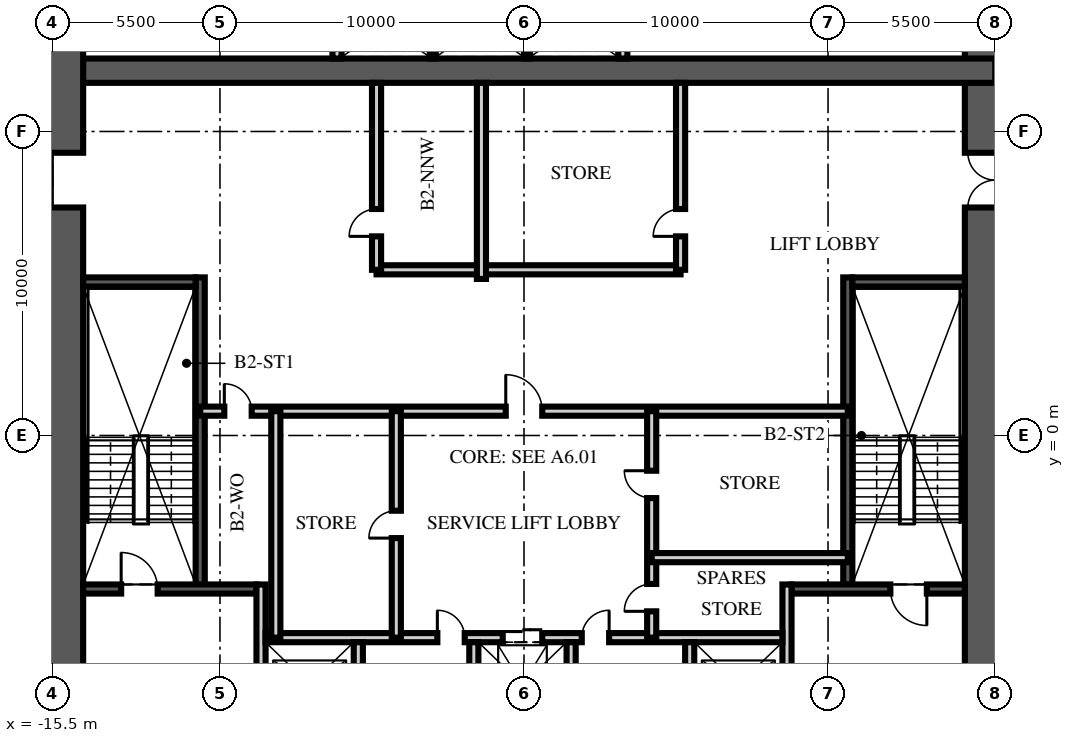
"""IFC4 building model, lengths in metres.
Left out: names, types, materials, properties, quantities, classifications, styles, units other than length and angle.
Written with IfcOpenShell. Run it as: python <this file> out.ifc"""

import sys

from ifc_helpers import new_model, si_unit, direction, frame, frame_2d, origin, place, context, subcontext, project, spatial, rectangle, extrude, element, fill, save


model = new_model("IFC4")
c1 = context("Model", 3, precision=1e-05, world=origin(), true_north=direction((0.0, 1.0)))
c2 = subcontext(c1, "Body", "Model", "MODEL_VIEW")
j1 = project(units=[si_unit("LENGTHUNIT", "METRE"), si_unit("PLANEANGLEUNIT", "RADIAN")], contexts=[c1])
p1 = place(None, origin())
s1 = spatial("IfcSite", under=j1, at=p1, CompositionType="ELEMENT")
p2 = place(p1, origin())
s2 = spatial("IfcBuilding", under=s1, at=p2, CompositionType="ELEMENT")
p3 = place(p2, frame((0.0, 0.0, -9.0)))
s3 = spatial("IfcBuildingStorey", under=s2, at=p3, CompositionType="ELEMENT", Elevation=-9.0)
p4 = place(p3, frame((15.5, -15.5, -0.3), z_axis=(0.0, 0.0, 1.0), x_axis=(0.0, 1.0, 0.0)))
e1 = element("IfcWall", 1, at=p4, inside=s3, PredefinedType="SHEAR", context=c2, shape_type="SweptSolid", body=[
    extrude(rectangle(XDim=31.0, YDim=2.0, at=frame_2d((15.5, 0.0))), origin(), (0.0, 0.0, 1.0), 3.6),
])
p5 = place(p4, frame((6.5, 0.0, 0.3)))
e2 = element("IfcOpeningElement", 2, at=p5, cuts=e1, PredefinedType="OPENING", context=c2, shape_type="SweptSolid", body=[
    extrude(rectangle(XDim=1.2, YDim=2.1, at=frame_2d((0.6, 1.05))), frame((0.0, 1.01, 0.0), z_axis=(0.0, -1.0, 0.0), x_axis=(1.0, 0.0, 0.0)), (0.0, 0.0, 1.0), 2.02),
])
p6 = place(p4, frame((23.0, 0.0, 0.3)))
e3 = element("IfcOpeningElement", 3, at=p6, cuts=e1, PredefinedType="OPENING", context=c2, shape_type="SweptSolid", body=[
    extrude(rectangle(XDim=1.8, YDim=2.1, at=frame_2d((0.9, 1.05))), frame((0.0, 1.01, 0.0), z_axis=(0.0, -1.0, 0.0), x_axis=(1.0, 0.0, 0.0)), (0.0, 0.0, 1.0), 2.02),
])
p7 = place(p3, frame((-15.5, 12.0, -0.3), z_axis=(0.0, 0.0, 1.0), x_axis=(1.0, 0.0, 0.0)))
e4 = element("IfcWall", 4, at=p7, inside=s3, PredefinedType="SHEAR", context=c2, shape_type="SweptSolid", body=[
    extrude(rectangle(XDim=31.0, YDim=0.8, at=frame_2d((15.5, 0.0))), origin(), (0.0, 0.0, 1.0), 3.6),
])
p8 = place(p3, frame((-15.5, -15.5, -0.3), z_axis=(0.0, 0.0, 1.0), x_axis=(0.0, 1.0, 0.0)))
e5 = element("IfcWall", 5, at=p8, inside=s3, PredefinedType="SHEAR", context=c2, shape_type="SweptSolid", body=[
    extrude(rectangle(XDim=31.0, YDim=2.0, at=frame_2d((15.5, 0.0))), origin(), (0.0, 0.0, 1.0), 3.6),
])
p9 = place(p8, frame((6.5, 0.0, 0.3)))
e6 = element("IfcOpeningElement", 6, at=p9, cuts=e5, PredefinedType="OPENING", context=c2, shape_type="SweptSolid", body=[
    extrude(rectangle(XDim=1.2, YDim=2.1, at=frame_2d((0.6, 1.05))), frame((0.0, 1.01, 0.0), z_axis=(0.0, -1.0, 0.0), x_axis=(1.0, 0.0, 0.0)), (0.0, 0.0, 1.0), 2.02),
])
p10 = place(p8, frame((23.0, 0.0, 0.3)))
e7 = element("IfcOpeningElement", 7, at=p10, cuts=e5, PredefinedType="OPENING", context=c2, shape_type="SweptSolid", body=[
    extrude(rectangle(XDim=1.8, YDim=2.1, at=frame_2d((0.9, 1.05))), frame((0.0, 1.01, 0.0), z_axis=(0.0, -1.0, 0.0), x_axis=(1.0, 0.0, 0.0)), (0.0, 0.0, 1.0), 2.02),
])
p11 = place(p3, frame((-10.65, -4.9, 0.0), z_axis=(0.0, 0.0, 1.0), x_axis=(0.0, 1.0, 0.0)))
e8 = element("IfcWall", 8, at=p11, inside=s3, PredefinedType="SOLIDWALL", context=c2, shape_type="SweptSolid", body=[
    extrude(rectangle(XDim=10.1, YDim=0.3, at=frame_2d((5.05, 0.0))), origin(), (0.0, 0.0, 1.0), 3.3),
])
p12 = place(p3, frame((-14.5, -5.05, 0.0), z_axis=(0.0, 0.0, 1.0), x_axis=(1.0, 0.0, 0.0)))
e9 = element("IfcWall", 9, at=p12, inside=s3, PredefinedType="SOLIDWALL", context=c2, shape_type="SweptSolid", body=[
    extrude(rectangle(XDim=5.7, YDim=0.3, at=frame_2d((2.85, 0.0))), origin(), (0.0, 0.0, 1.0), 3.3),
])
p13 = place(p12, frame((1.25, 0.0, 0.0)))
e10 = element("IfcOpeningElement", 10, at=p13, cuts=e9, PredefinedType="OPENING", context=c2, shape_type="SweptSolid", body=[
    extrude(rectangle(XDim=1.2, YDim=2.1, at=frame_2d((0.6, 1.05))), frame((0.0, 0.16, 0.0), z_axis=(0.0, -1.0, 0.0), x_axis=(1.0, 0.0, 0.0)), (0.0, 0.0, 1.0), 0.32),
])
p14 = place(p3, frame((-14.5, 5.05, 0.0), z_axis=(0.0, 0.0, 1.0), x_axis=(1.0, 0.0, 0.0)))
e11 = element("IfcWall", 11, at=p14, inside=s3, PredefinedType="SOLIDWALL", context=c2, shape_type="SweptSolid", body=[
    extrude(rectangle(XDim=3.7, YDim=0.3, at=frame_2d((1.85, 0.0))), origin(), (0.0, 0.0, 1.0), 3.3),
])
p15 = place(p3, frame((-8.65, -11.6, 0.0), z_axis=(0.0, 0.0, 1.0), x_axis=(0.0, 1.0, 0.0)))
e12 = element("IfcWall", 12, at=p15, inside=s3, PredefinedType="PARTITIONING", context=c2, shape_type="SweptSolid", body=[
    extrude(rectangle(XDim=6.7, YDim=0.3, at=frame_2d((3.35, 0.0))), origin(), (0.0, 0.0, 1.0), 3.3),
])
p16 = place(p15, frame((2.85, 0.0, 0.0)))
e13 = element("IfcOpeningElement", 13, at=p16, cuts=e12, PredefinedType="OPENING", context=c2, shape_type="SweptSolid", body=[
    extrude(rectangle(XDim=1.1, YDim=2.1, at=frame_2d((0.55, 1.05))), frame((0.0, 0.16, 0.0), z_axis=(0.0, -1.0, 0.0), x_axis=(1.0, 0.0, 0.0)), (0.0, 0.0, 1.0), 0.32),
])
p17 = place(p3, frame((10.65, -4.9, 0.0), z_axis=(0.0, 0.0, 1.0), x_axis=(0.0, 1.0, 0.0)))
e14 = element("IfcWall", 14, at=p17, inside=s3, PredefinedType="SOLIDWALL", context=c2, shape_type="SweptSolid", body=[
    extrude(rectangle(XDim=10.1, YDim=0.3, at=frame_2d((5.05, 0.0))), origin(), (0.0, 0.0, 1.0), 3.3),
])
p18 = place(p3, frame((14.5, -5.05, 0.0), z_axis=(0.0, 0.0, 1.0), x_axis=(-1.0, 0.0, 0.0)))
e15 = element("IfcWall", 15, at=p18, inside=s3, PredefinedType="SOLIDWALL", context=c2, shape_type="SweptSolid", body=[
    extrude(rectangle(XDim=5.7, YDim=0.3, at=frame_2d((2.85, 0.0))), origin(), (0.0, 0.0, 1.0), 3.3),
])
p19 = place(p18, frame((1.25, 0.0, 0.0)))
e16 = element("IfcOpeningElement", 16, at=p19, cuts=e15, PredefinedType="OPENING", context=c2, shape_type="SweptSolid", body=[
    extrude(rectangle(XDim=1.2, YDim=2.1, at=frame_2d((0.6, 1.05))), frame((0.0, 0.16, 0.0), z_axis=(0.0, -1.0, 0.0), x_axis=(1.0, 0.0, 0.0)), (0.0, 0.0, 1.0), 0.32),
])
p20 = place(p3, frame((14.5, 5.05, 0.0), z_axis=(0.0, 0.0, 1.0), x_axis=(-1.0, 0.0, 0.0)))
e17 = element("IfcWall", 17, at=p20, inside=s3, PredefinedType="SOLIDWALL", context=c2, shape_type="SweptSolid", body=[
    extrude(rectangle(XDim=3.7, YDim=0.3, at=frame_2d((1.85, 0.0))), origin(), (0.0, 0.0, 1.0), 3.3),
])
p21 = place(p3, frame((8.65, -11.6, 0.0), z_axis=(0.0, 0.0, 1.0), x_axis=(0.0, 1.0, 0.0)))
e18 = element("IfcWall", 18, at=p21, inside=s3, PredefinedType="PARTITIONING", context=c2, shape_type="SweptSolid", body=[
    extrude(rectangle(XDim=6.7, YDim=0.3, at=frame_2d((3.35, 0.0))), origin(), (0.0, 0.0, 1.0), 3.3),
])
p22 = place(p21, frame((2.85, 0.0, 0.0)))
e19 = element("IfcOpeningElement", 19, at=p22, cuts=e18, PredefinedType="OPENING", context=c2, shape_type="SweptSolid", body=[
    extrude(rectangle(XDim=1.1, YDim=2.1, at=frame_2d((0.55, 1.05))), frame((0.0, 0.16, 0.0), z_axis=(0.0, -1.0, 0.0), x_axis=(1.0, 0.0, 0.0)), (0.0, 0.0, 1.0), 0.32),
])
p23 = place(p3, frame((-8.5, -6.65, 0.0), z_axis=(0.0, 0.0, 1.0), x_axis=(1.0, 0.0, 0.0)))
e20 = element("IfcWall", 20, at=p23, inside=s3, PredefinedType="PARTITIONING", context=c2, shape_type="SweptSolid", body=[
    extrude(rectangle(XDim=17.0, YDim=0.3, at=frame_2d((8.5, 0.0))), origin(), (0.0, 0.0, 1.0), 3.3),
])
p24 = place(p23, frame((7.8, 0.0, 0.0)))
e21 = element("IfcOpeningElement", 21, at=p24, cuts=e20, PredefinedType="OPENING", context=c2, shape_type="SweptSolid", body=[
    extrude(rectangle(XDim=1.3, YDim=2.4, at=frame_2d((0.65, 1.2))), frame((0.0, 0.16, 0.0), z_axis=(0.0, -1.0, 0.0), x_axis=(1.0, 0.0, 0.0)), (0.0, 0.0, 1.0), 0.32),
])
p25 = place(p23, frame((5.65, 0.0, 0.0)))
e22 = element("IfcOpeningElement", 22, at=p25, cuts=e20, PredefinedType="OPENING", context=c2, shape_type="SweptSolid", body=[
    extrude(rectangle(XDim=0.9, YDim=2.1, at=frame_2d((0.45, 1.05))), frame((0.0, 0.16, 0.0), z_axis=(0.0, -1.0, 0.0), x_axis=(1.0, 0.0, 0.0)), (0.0, 0.0, 1.0), 0.32),
])
p26 = place(p23, frame((10.4, 0.0, 0.0)))
e23 = element("IfcOpeningElement", 23, at=p26, cuts=e20, PredefinedType="OPENING", context=c2, shape_type="SweptSolid", body=[
    extrude(rectangle(XDim=0.9, YDim=2.1, at=frame_2d((0.45, 1.05))), frame((0.0, 0.16, 0.0), z_axis=(0.0, -1.0, 0.0), x_axis=(1.0, 0.0, 0.0)), (0.0, 0.0, 1.0), 0.32),
])
for number, where, z_axis, x_axis in (
    (24, (-5.45, -11.6, 0.0), (0.0, 0.0, 1.0), (0.0, 1.0, 0.0)),
    (25, (-1.65, -11.6, 0.0), (0.0, 0.0, 1.0), (0.0, 1.0, 0.0)),
    (26, (1.55, -11.6, 0.0), (0.0, 0.0, 1.0), (0.0, 1.0, 0.0)),
    (27, (5.45, -11.6, 0.0), (0.0, 0.0, 1.0), (0.0, 1.0, 0.0)),
):
    element("IfcWall", number, at=place(p3, frame(where, z_axis=z_axis, x_axis=x_axis)), inside=s3, PredefinedType="PARTITIONING", context=c2, shape_type="SweptSolid", body=[
        extrude(rectangle(XDim=4.8, YDim=0.3, at=frame_2d((2.4, 0.0))), origin(), (0.0, 0.0, 1.0), 3.3),
    ])
for number, where, z_axis, x_axis in (
    (28, (-6.15, 12.4, 0.0), (0.0, 0.0, 1.0), (0.0, 1.0, 0.0)),
    (29, (3.25, 12.4, 0.0), (0.0, 0.0, 1.0), (0.0, 1.0, 0.0)),
):
    element("IfcWall", number, at=place(p3, frame(where, z_axis=z_axis, x_axis=x_axis)), inside=s3, PredefinedType="PARTITIONING", context=c2, shape_type="SweptSolid", body=[
        extrude(rectangle(XDim=2.1, YDim=0.3, at=frame_2d((1.05, 0.0))), origin(), (0.0, 0.0, 1.0), 3.3),
    ])
for number, where, z_axis, x_axis in (
    (30, (-3.0, 12.4, 0.0), (0.0, 0.0, 1.0), (0.0, 1.0, 0.0)),
    (31, (0.1, 12.4, 0.0), (0.0, 0.0, 1.0), (0.0, 1.0, 0.0)),
):
    element("IfcWall", number, at=place(p3, frame(where, z_axis=z_axis, x_axis=x_axis)), inside=s3, PredefinedType="PARTITIONING", context=c2, shape_type="SweptSolid", body=[
        extrude(rectangle(XDim=2.1, YDim=0.2, at=frame_2d((1.05, 0.0))), origin(), (0.0, 0.0, 1.0), 3.3),
    ])
p27 = place(p3, frame((-10.65, 0.8, 0.0), z_axis=(0.0, 0.0, 1.0), x_axis=(1.0, 0.0, 0.0)))
e32 = element("IfcWall", 32, at=p27, inside=s3, PredefinedType="PARTITIONING", context=c2, shape_type="SweptSolid", body=[
    extrude(rectangle(XDim=21.3, YDim=0.3, at=frame_2d((10.65, 0.0))), origin(), (0.0, 0.0, 1.0), 3.3),
])
p28 = place(p27, frame((10.05, 0.0, 0.0)))
e33 = element("IfcOpeningElement", 33, at=p28, cuts=e32, PredefinedType="OPENING", context=c2, shape_type="SweptSolid", body=[
    extrude(rectangle(XDim=1.2, YDim=2.1, at=frame_2d((0.6, 1.05))), frame((0.0, 0.16, 0.0), z_axis=(0.0, -1.0, 0.0), x_axis=(1.0, 0.0, 0.0)), (0.0, 0.0, 1.0), 0.32),
])
p29 = place(p27, frame((0.793, 0.0, 0.0)))
e34 = element("IfcOpeningElement", 34, at=p29, cuts=e32, PredefinedType="OPENING", context=c2, shape_type="SweptSolid", body=[
    extrude(rectangle(XDim=0.9, YDim=2.1, at=frame_2d((0.45, 1.05))), frame((0.0, 0.16, 0.0), z_axis=(0.0, -1.0, 0.0), x_axis=(1.0, 0.0, 0.0)), (0.0, 0.0, 1.0), 0.32),
])
p30 = place(p3, frame((-4.2, -6.65, 0.0), z_axis=(0.0, 0.0, 1.0), x_axis=(0.0, 1.0, 0.0)))
e35 = element("IfcWall", 35, at=p30, inside=s3, PredefinedType="PARTITIONING", context=c2, shape_type="SweptSolid", body=[
    extrude(rectangle(XDim=7.45, YDim=0.3, at=frame_2d((3.725, 0.0))), origin(), (0.0, 0.0, 1.0), 3.3),
])
p31 = place(p30, frame((3.275, 0.0, 0.0)))
e36 = element("IfcOpeningElement", 36, at=p31, cuts=e35, PredefinedType="OPENING", context=c2, shape_type="SweptSolid", body=[
    extrude(rectangle(XDim=0.9, YDim=2.1, at=frame_2d((0.45, 1.05))), frame((0.0, 0.16, 0.0), z_axis=(0.0, -1.0, 0.0), x_axis=(1.0, 0.0, 0.0)), (0.0, 0.0, 1.0), 0.32),
])
p32 = place(p3, frame((4.2, -6.65, 0.0), z_axis=(0.0, 0.0, 1.0), x_axis=(0.0, 1.0, 0.0)))
e37 = element("IfcWall", 37, at=p32, inside=s3, PredefinedType="PARTITIONING", context=c2, shape_type="SweptSolid", body=[
    extrude(rectangle(XDim=7.45, YDim=0.3, at=frame_2d((3.725, 0.0))), origin(), (0.0, 0.0, 1.0), 3.3),
])
p33 = place(p32, frame((0.866, 0.0, 0.0)))
e38 = element("IfcOpeningElement", 38, at=p33, cuts=e37, PredefinedType="OPENING", context=c2, shape_type="SweptSolid", body=[
    extrude(rectangle(XDim=0.9, YDim=2.1, at=frame_2d((0.45, 1.05))), frame((0.0, 0.16, 0.0), z_axis=(0.0, -1.0, 0.0), x_axis=(1.0, 0.0, 0.0)), (0.0, 0.0, 1.0), 0.32),
])
p34 = place(p32, frame((4.591, 0.0, 0.0)))
e39 = element("IfcOpeningElement", 39, at=p34, cuts=e37, PredefinedType="OPENING", context=c2, shape_type="SweptSolid", body=[
    extrude(rectangle(XDim=0.9, YDim=2.1, at=frame_2d((0.45, 1.05))), frame((0.0, 0.16, 0.0), z_axis=(0.0, -1.0, 0.0), x_axis=(1.0, 0.0, 0.0)), (0.0, 0.0, 1.0), 0.32),
])
p35 = place(p3, frame((-8.163, -6.65, 0.0), z_axis=(0.0, 0.0, 1.0), x_axis=(0.0, 1.0, 0.0)))
e40 = element("IfcWall", 40, at=p35, inside=s3, PredefinedType="PARTITIONING", context=c2, shape_type="SweptSolid", body=[
    extrude(rectangle(XDim=7.45, YDim=0.3, at=frame_2d((3.725, 0.0))), origin(), (0.0, 0.0, 1.0), 3.3),
])
p36 = place(p3, frame((10.65, -4.018, 0.0), z_axis=(0.0, 0.0, 1.0), x_axis=(-1.0, 0.0, 0.0)))
e41 = element("IfcWall", 41, at=p36, inside=s3, PredefinedType="PARTITIONING", context=c2, shape_type="SweptSolid", body=[
    extrude(rectangle(XDim=6.45, YDim=0.3, at=frame_2d((3.225, 0.0))), origin(), (0.0, 0.0, 1.0), 3.3),
])
p37 = place(p3, frame((-4.85, 5.45, 0.0), z_axis=(0.0, 0.0, 1.0), x_axis=(1.0, 0.0, 0.0)))
e42 = element("IfcWall", 42, at=p37, inside=s3, PredefinedType="PARTITIONING", context=c2, shape_type="SweptSolid", body=[
    extrude(rectangle(XDim=10.0, YDim=0.3, at=frame_2d((5.0, 0.0))), origin(), (0.0, 0.0, 1.0), 3.3),
])
p38 = place(p3, frame((-4.85, 5.45, 0.0), z_axis=(0.0, 0.0, 1.0), x_axis=(0.0, 1.0, 0.0)))
e43 = element("IfcWall", 43, at=p38, inside=s3, PredefinedType="PARTITIONING", context=c2, shape_type="SweptSolid", body=[
    extrude(rectangle(XDim=6.15, YDim=0.3, at=frame_2d((3.075, 0.0))), origin(), (0.0, 0.0, 1.0), 3.3),
])
p39 = place(p38, frame((1.1, 0.0, 0.0)))
e44 = element("IfcOpeningElement", 44, at=p39, cuts=e43, PredefinedType="OPENING", context=c2, shape_type="SweptSolid", body=[
    extrude(rectangle(XDim=0.9, YDim=2.1, at=frame_2d((0.45, 1.05))), frame((0.0, 0.16, 0.0), z_axis=(0.0, -1.0, 0.0), x_axis=(1.0, 0.0, 0.0)), (0.0, 0.0, 1.0), 0.32),
])
p40 = place(p3, frame((5.15, 5.45, 0.0), z_axis=(0.0, 0.0, 1.0), x_axis=(0.0, 1.0, 0.0)))
e45 = element("IfcWall", 45, at=p40, inside=s3, PredefinedType="PARTITIONING", context=c2, shape_type="SweptSolid", body=[
    extrude(rectangle(XDim=6.15, YDim=0.3, at=frame_2d((3.075, 0.0))), origin(), (0.0, 0.0, 1.0), 3.3),
])
p41 = place(p40, frame((1.1, 0.0, 0.0)))
e46 = element("IfcOpeningElement", 46, at=p41, cuts=e45, PredefinedType="OPENING", context=c2, shape_type="SweptSolid", body=[
    extrude(rectangle(XDim=0.9, YDim=2.1, at=frame_2d((0.45, 1.05))), frame((0.0, 0.16, 0.0), z_axis=(0.0, -1.0, 0.0), x_axis=(1.0, 0.0, 0.0)), (0.0, 0.0, 1.0), 0.32),
])
p42 = place(p3, frame((-1.4, 5.15, 0.0), z_axis=(0.0, 0.0, 1.0), x_axis=(0.0, 1.0, 0.0)))
e47 = element("IfcWall", 47, at=p42, inside=s3, PredefinedType="PARTITIONING", context=c2, shape_type="SweptSolid", body=[
    extrude(rectangle(XDim=6.45, YDim=0.3, at=frame_2d((3.225, 0.0))), origin(), (0.0, 0.0, 1.0), 3.3),
])
p43 = place(p13, origin())
e48 = element("IfcDoor", 48, at=p43, inside=s3, OperationType="SINGLE_SWING_LEFT", PredefinedType="DOOR", context=c2, shape_type="SweptSolid", body=[
    extrude(rectangle(XDim=1.2, YDim=2.1, at=frame_2d((0.6, 1.05))), frame((0.0, 0.025, 0.0), z_axis=(0.0, -1.0, 0.0), x_axis=(1.0, 0.0, 0.0)), (0.0, 0.0, 1.0), 0.05),
])
fill(e10, e48)
p44 = place(p10, origin())
e49 = element("IfcDoor", 49, at=p44, inside=s3, OperationType="DOUBLE_DOOR_SINGLE_SWING", PredefinedType="DOOR", context=c2, shape_type="SweptSolid", body=[
    extrude(rectangle(XDim=1.8, YDim=2.1, at=frame_2d((0.9, 1.05))), frame((0.0, 0.025, 0.0), z_axis=(0.0, -1.0, 0.0), x_axis=(1.0, 0.0, 0.0)), (0.0, 0.0, 1.0), 0.05),
])
fill(e7, e49)
p45 = place(p19, origin())
e50 = element("IfcDoor", 50, at=p45, inside=s3, OperationType="SINGLE_SWING_LEFT", PredefinedType="DOOR", context=c2, shape_type="SweptSolid", body=[
    extrude(rectangle(XDim=1.2, YDim=2.1, at=frame_2d((0.6, 1.05))), frame((0.0, 0.025, 0.0), z_axis=(0.0, -1.0, 0.0), x_axis=(1.0, 0.0, 0.0)), (0.0, 0.0, 1.0), 0.05),
])
fill(e16, e50)
p46 = place(p6, origin())
e51 = element("IfcDoor", 51, at=p46, inside=s3, OperationType="DOUBLE_DOOR_SINGLE_SWING", PredefinedType="DOOR", context=c2, shape_type="SweptSolid", body=[
    extrude(rectangle(XDim=1.8, YDim=2.1, at=frame_2d((0.9, 1.05))), frame((0.0, 0.025, 0.0), z_axis=(0.0, -1.0, 0.0), x_axis=(1.0, 0.0, 0.0)), (0.0, 0.0, 1.0), 0.05),
])
fill(e3, e51)
p47 = place(p24, origin())
e52 = element("IfcDoor", 52, at=p47, inside=s3, OperationType="DOUBLE_DOOR_SLIDING", PredefinedType="DOOR", context=c2, shape_type="SweptSolid", body=[
    extrude(rectangle(XDim=1.3, YDim=2.4, at=frame_2d((0.65, 1.2))), frame((0.0, 0.025, 0.0), z_axis=(0.0, -1.0, 0.0), x_axis=(1.0, 0.0, 0.0)), (0.0, 0.0, 1.0), 0.05),
])
fill(e21, e52)
p48 = place(p28, origin())
e53 = element("IfcDoor", 53, at=p48, inside=s3, OperationType="SINGLE_SWING_LEFT", PredefinedType="DOOR", context=c2, shape_type="SweptSolid", body=[
    extrude(rectangle(XDim=1.2, YDim=2.1, at=frame_2d((0.6, 1.05))), frame((0.0, 0.025, 0.0), z_axis=(0.0, -1.0, 0.0), x_axis=(1.0, 0.0, 0.0)), (0.0, 0.0, 1.0), 0.05),
])
fill(e33, e53)
p49 = place(p25, origin())
e54 = element("IfcDoor", 54, at=p49, inside=s3, OperationType="SINGLE_SWING_LEFT", PredefinedType="DOOR", context=c2, shape_type="SweptSolid", body=[
    extrude(rectangle(XDim=0.9, YDim=2.1, at=frame_2d((0.45, 1.05))), frame((0.0, 0.025, 0.0), z_axis=(0.0, -1.0, 0.0), x_axis=(1.0, 0.0, 0.0)), (0.0, 0.0, 1.0), 0.05),
])
fill(e22, e54)
p50 = place(p26, origin())
e55 = element("IfcDoor", 55, at=p50, inside=s3, OperationType="SINGLE_SWING_RIGHT", PredefinedType="DOOR", context=c2, shape_type="SweptSolid", body=[
    extrude(rectangle(XDim=0.9, YDim=2.1, at=frame_2d((0.45, 1.05))), frame((0.0, 0.025, 0.0), z_axis=(0.0, -1.0, 0.0), x_axis=(1.0, 0.0, 0.0)), (0.0, 0.0, 1.0), 0.05),
])
fill(e23, e55)
p51 = place(p31, origin())
e56 = element("IfcDoor", 56, at=p51, inside=s3, OperationType="SINGLE_SWING_LEFT", PredefinedType="DOOR", context=c2, shape_type="SweptSolid", body=[
    extrude(rectangle(XDim=0.9, YDim=2.1, at=frame_2d((0.45, 1.05))), frame((0.0, 0.025, 0.0), z_axis=(0.0, -1.0, 0.0), x_axis=(1.0, 0.0, 0.0)), (0.0, 0.0, 1.0), 0.05),
])
fill(e36, e56)
p52 = place(p29, origin())
e57 = element("IfcDoor", 57, at=p52, inside=s3, OperationType="SINGLE_SWING_LEFT", PredefinedType="DOOR", context=c2, shape_type="SweptSolid", body=[
    extrude(rectangle(XDim=0.9, YDim=2.1, at=frame_2d((0.45, 1.05))), frame((0.0, 0.025, 0.0), z_axis=(0.0, -1.0, 0.0), x_axis=(1.0, 0.0, 0.0)), (0.0, 0.0, 1.0), 0.05),
])
fill(e34, e57)
p53 = place(p33, origin())
e58 = element("IfcDoor", 58, at=p53, inside=s3, OperationType="SINGLE_SWING_LEFT", PredefinedType="DOOR", context=c2, shape_type="SweptSolid", body=[
    extrude(rectangle(XDim=0.9, YDim=2.1, at=frame_2d((0.45, 1.05))), frame((0.0, 0.025, 0.0), z_axis=(0.0, -1.0, 0.0), x_axis=(1.0, 0.0, 0.0)), (0.0, 0.0, 1.0), 0.05),
])
fill(e38, e58)
p54 = place(p34, origin())
e59 = element("IfcDoor", 59, at=p54, inside=s3, OperationType="SINGLE_SWING_RIGHT", PredefinedType="DOOR", context=c2, shape_type="SweptSolid", body=[
    extrude(rectangle(XDim=0.9, YDim=2.1, at=frame_2d((0.45, 1.05))), frame((0.0, 0.025, 0.0), z_axis=(0.0, -1.0, 0.0), x_axis=(1.0, 0.0, 0.0)), (0.0, 0.0, 1.0), 0.05),
])
fill(e39, e59)
p55 = place(p39, origin())
e60 = element("IfcDoor", 60, at=p55, inside=s3, OperationType="SINGLE_SWING_LEFT", PredefinedType="DOOR", context=c2, shape_type="SweptSolid", body=[
    extrude(rectangle(XDim=0.9, YDim=2.1, at=frame_2d((0.45, 1.05))), frame((0.0, 0.025, 0.0), z_axis=(0.0, -1.0, 0.0), x_axis=(1.0, 0.0, 0.0)), (0.0, 0.0, 1.0), 0.05),
])
fill(e44, e60)
p56 = place(p41, origin())
e61 = element("IfcDoor", 61, at=p56, inside=s3, OperationType="SINGLE_SWING_LEFT", PredefinedType="DOOR", context=c2, shape_type="SweptSolid", body=[
    extrude(rectangle(XDim=0.9, YDim=2.1, at=frame_2d((0.45, 1.05))), frame((0.0, 0.025, 0.0), z_axis=(0.0, -1.0, 0.0), x_axis=(1.0, 0.0, 0.0)), (0.0, 0.0, 1.0), 0.05),
])
fill(e46, e61)
save(model, sys.argv[1])
